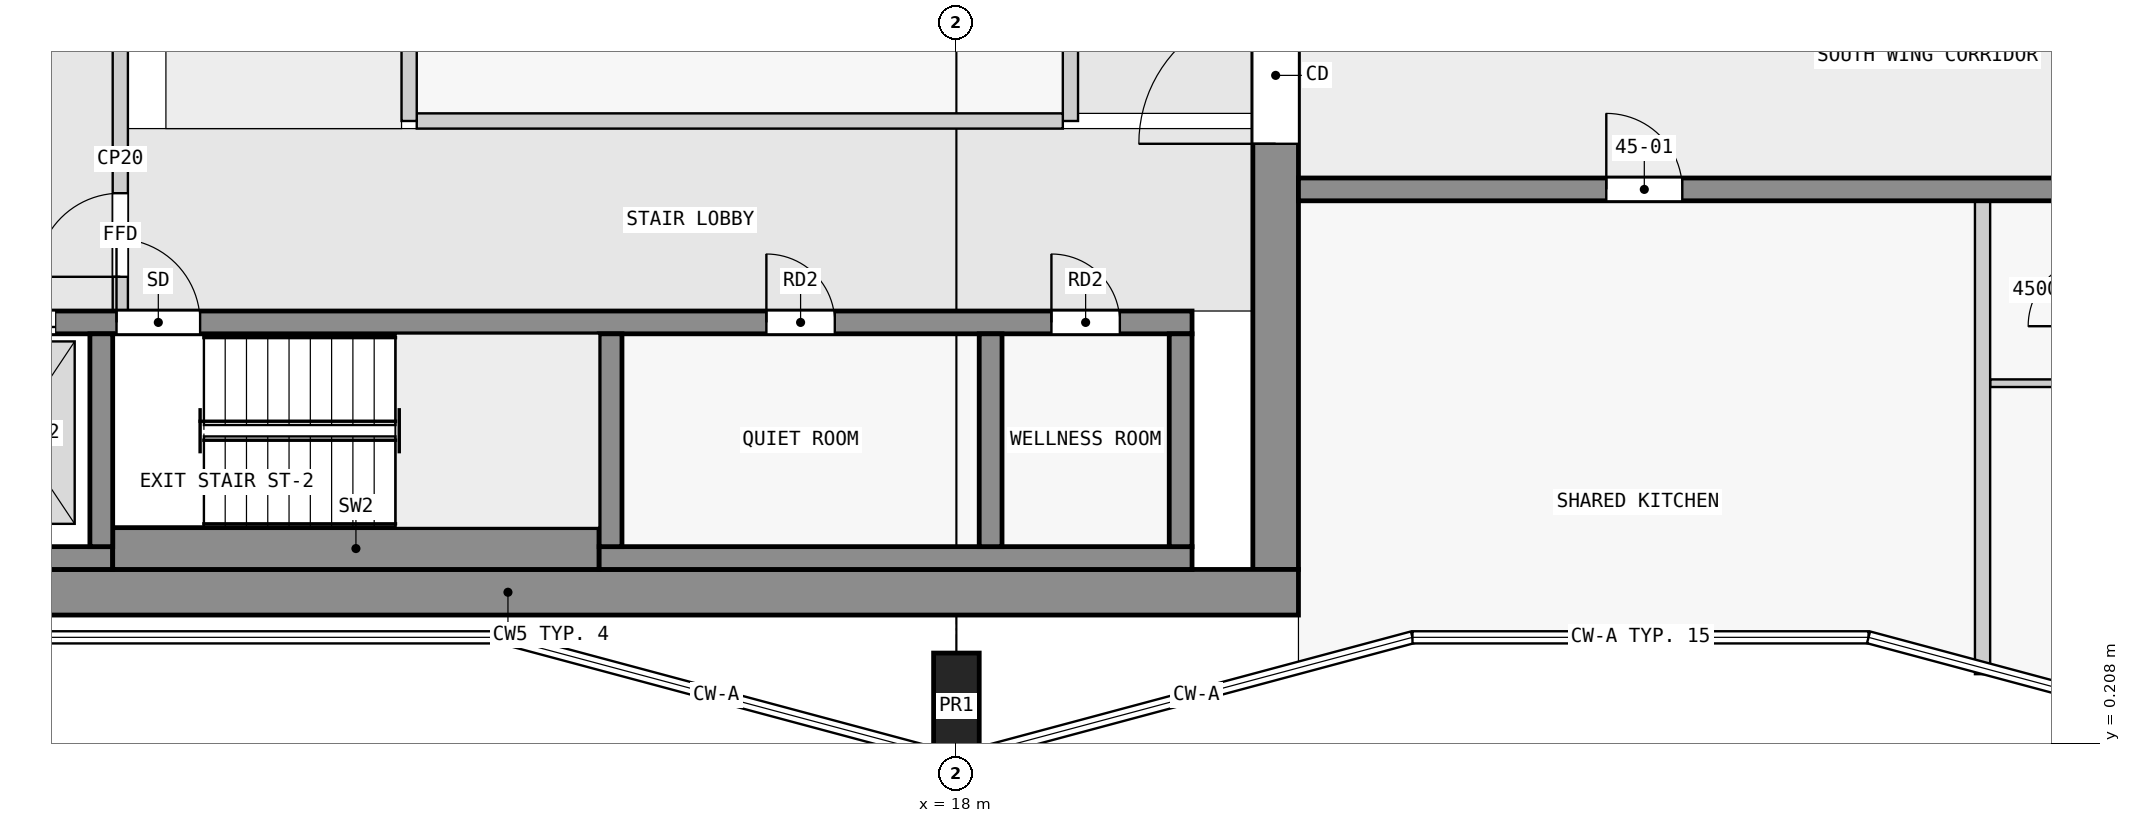
"""IFC4 building model, lengths in metres.
Left out: names, types, materials, properties, quantities, classifications, styles, units other than length and angle.
Written with IfcOpenShell. Run it as: python <this file> out.ifc"""

import sys

from ifc_helpers import new_model, si_unit, direction, frame, frame_2d, origin, origin_2d, place, context, subcontext, project, spatial, rectangle, extrude, element, fill, save


model = new_model("IFC4")
c1 = context("Model", 3, precision=1e-05, world=origin(), true_north=direction((0.0, 1.0)))
c2 = subcontext(c1, "Body", "Model", "MODEL_VIEW")
j1 = project(units=[si_unit("LENGTHUNIT", "METRE"), si_unit("PLANEANGLEUNIT", "RADIAN")], contexts=[c1])
p1 = place(None, origin())
s1 = spatial("IfcSite", under=j1, at=p1, CompositionType="ELEMENT")
p2 = place(p1, origin())
s2 = spatial("IfcBuilding", under=s1, at=p2, CompositionType="ELEMENT")
p3 = place(p2, frame((0.0, 0.0, 174.4)))
s3 = spatial("IfcBuildingStorey", under=s2, at=p3, CompositionType="ELEMENT", Elevation=174.4)
p4 = place(p3, frame((18.0, 0.7, 0.0), z_axis=(0.0, 0.0, 1.0), x_axis=(1.0, 0.0, 0.0)))
e1 = element("IfcColumn", 1, at=p4, inside=s3, PredefinedType="COLUMN", context=c2, shape_type="SweptSolid", body=[
    extrude(rectangle(XDim=0.6, YDim=1.4, at=origin_2d()), origin(), (0.0, 0.0, 1.0), 3.5),
])
p5 = place(p3, frame((1.7, 2.2, 0.0), z_axis=(0.0, 0.0, 1.0), x_axis=(1.0, 0.0, 0.0)))
e2 = element("IfcWall", 2, at=p5, inside=s3, PredefinedType="SHEAR", context=c2, shape_type="SweptSolid", body=[
    extrude(rectangle(XDim=20.8, YDim=0.6, at=frame_2d((10.4, 0.0))), origin(), (0.0, 0.0, 1.0), 3.25),
])
p6 = place(p3, frame((22.2, 2.5, 0.0), z_axis=(0.0, 0.0, 1.0), x_axis=(0.0, 1.0, 0.0)))
e3 = element("IfcWall", 3, at=p6, inside=s3, PredefinedType="SHEAR", context=c2, shape_type="SweptSolid", body=[
    extrude(rectangle(XDim=14.9, YDim=0.6, at=frame_2d((7.45, 0.0))), origin(), (0.0, 0.0, 1.0), 3.25),
])
p7 = place(p6, frame((5.6, 0.0, 0.0)))
e4 = element("IfcOpeningElement", 4, at=p7, cuts=e3, PredefinedType="OPENING", context=c2, shape_type="SweptSolid", body=[
    extrude(rectangle(XDim=1.8, YDim=2.1, at=frame_2d((0.9, 1.05))), frame((0.0, 0.31, 0.0), z_axis=(0.0, -1.0, 0.0), x_axis=(1.0, 0.0, 0.0)), (0.0, 0.0, 1.0), 0.62),
])
p8 = place(p3, frame((2.3, 2.65, 0.0), z_axis=(0.0, 0.0, 1.0), x_axis=(1.0, 0.0, 0.0)))
e5 = element("IfcWall", 5, at=p8, inside=s3, PredefinedType="SHEAR", context=c2, shape_type="SweptSolid", body=[
    extrude(rectangle(XDim=4.6, YDim=0.3, at=frame_2d((2.3, 0.0))), origin(), (0.0, 0.0, 1.0), 3.25),
])
p9 = place(p3, frame((6.9, 2.775, 0.0), z_axis=(0.0, 0.0, 1.0), x_axis=(1.0, 0.0, 0.0)))
e6 = element("IfcWall", 6, at=p9, inside=s3, PredefinedType="SHEAR", context=c2, shape_type="SweptSolid", body=[
    extrude(rectangle(XDim=6.4, YDim=0.55, at=frame_2d((3.2, 0.0))), origin(), (0.0, 0.0, 1.0), 3.25),
])
p10 = place(p3, frame((13.3, 2.65, 0.0), z_axis=(0.0, 0.0, 1.0), x_axis=(1.0, 0.0, 0.0)))
e7 = element("IfcWall", 7, at=p10, inside=s3, PredefinedType="SHEAR", context=c2, shape_type="SweptSolid", body=[
    extrude(rectangle(XDim=7.8, YDim=0.3, at=frame_2d((3.9, 0.0))), origin(), (0.0, 0.0, 1.0), 3.25),
])
for number, where, z_axis, x_axis in (
    (8, (6.75, 2.8, 0.0), (0.0, 0.0, 1.0), (0.0, 1.0, 0.0)),
    (9, (13.45, 2.8, 0.0), (0.0, 0.0, 1.0), (0.0, 1.0, 0.0)),
    (10, (18.45, 2.8, 0.0), (0.0, 0.0, 1.0), (0.0, 1.0, 0.0)),
    (11, (20.95, 2.8, 0.0), (0.0, 0.0, 1.0), (0.0, 1.0, 0.0)),
):
    element("IfcWall", number, at=place(p3, frame(where, z_axis=z_axis, x_axis=x_axis)), inside=s3, PredefinedType="SHEAR", context=c2, shape_type="SweptSolid", body=[
        extrude(rectangle(XDim=2.8, YDim=0.3, at=frame_2d((1.4, 0.0))), origin(), (0.0, 0.0, 1.0), 3.25),
    ])
p11 = place(p3, frame((2.3, 5.75, 0.0), z_axis=(0.0, 0.0, 1.0), x_axis=(1.0, 0.0, 0.0)))
e12 = element("IfcWall", 12, at=p11, inside=s3, PredefinedType="SHEAR", context=c2, shape_type="SweptSolid", body=[
    extrude(rectangle(XDim=18.8, YDim=0.3, at=frame_2d((9.4, 0.0))), origin(), (0.0, 0.0, 1.0), 3.25),
])
p12 = place(p11, frame((4.65, 0.0, 0.0)))
e13 = element("IfcOpeningElement", 13, at=p12, cuts=e12, PredefinedType="OPENING", context=c2, shape_type="SweptSolid", body=[
    extrude(rectangle(XDim=1.1, YDim=2.1, at=frame_2d((0.55, 1.05))), frame((0.0, 0.16, 0.0), z_axis=(0.0, -1.0, 0.0), x_axis=(1.0, 0.0, 0.0)), (0.0, 0.0, 1.0), 0.32),
])
p13 = place(p11, frame((0.45, 0.0, 0.0)))
e14 = element("IfcOpeningElement", 14, at=p13, cuts=e12, PredefinedType="OPENING", context=c2, shape_type="SweptSolid", body=[
    extrude(rectangle(XDim=1.1, YDim=2.1, at=frame_2d((0.55, 1.05))), frame((0.0, 0.16, 0.0), z_axis=(0.0, -1.0, 0.0), x_axis=(1.0, 0.0, 0.0)), (0.0, 0.0, 1.0), 0.32),
])
p14 = place(p11, frame((2.75, 0.0, 0.0)))
e15 = element("IfcOpeningElement", 15, at=p14, cuts=e12, PredefinedType="OPENING", context=c2, shape_type="SweptSolid", body=[
    extrude(rectangle(XDim=1.1, YDim=2.1, at=frame_2d((0.55, 1.05))), frame((0.0, 0.16, 0.0), z_axis=(0.0, -1.0, 0.0), x_axis=(1.0, 0.0, 0.0)), (0.0, 0.0, 1.0), 0.32),
])
p15 = place(p11, frame((13.2, 0.0, 0.0)))
e16 = element("IfcOpeningElement", 16, at=p15, cuts=e12, PredefinedType="OPENING", context=c2, shape_type="SweptSolid", body=[
    extrude(rectangle(XDim=0.9, YDim=2.1, at=frame_2d((0.45, 1.05))), frame((0.0, 0.16, 0.0), z_axis=(0.0, -1.0, 0.0), x_axis=(1.0, 0.0, 0.0)), (0.0, 0.0, 1.0), 0.32),
])
p16 = place(p11, frame((16.95, 0.0, 0.0)))
e17 = element("IfcOpeningElement", 17, at=p16, cuts=e12, PredefinedType="OPENING", context=c2, shape_type="SweptSolid", body=[
    extrude(rectangle(XDim=0.9, YDim=2.1, at=frame_2d((0.45, 1.05))), frame((0.0, 0.16, 0.0), z_axis=(0.0, -1.0, 0.0), x_axis=(1.0, 0.0, 0.0)), (0.0, 0.0, 1.0), 0.32),
])
p17 = place(p3, frame((22.5, 7.5, 0.0), z_axis=(0.0, 0.0, 1.0), x_axis=(1.0, 0.0, 0.0)))
e18 = element("IfcWall", 18, at=p17, inside=s3, PredefinedType="SHEAR", context=c2, shape_type="SweptSolid", body=[
    extrude(rectangle(XDim=22.5, YDim=0.3, at=frame_2d((11.25, 0.0))), origin(), (0.0, 0.0, 1.0), 3.25),
])
p18 = place(p17, frame((4.05, 0.0, 0.0)))
e19 = element("IfcOpeningElement", 19, at=p18, cuts=e18, PredefinedType="OPENING", context=c2, shape_type="SweptSolid", body=[
    extrude(rectangle(XDim=1.0, YDim=2.1, at=frame_2d((0.5, 1.05))), frame((0.0, 0.16, 0.0), z_axis=(0.0, -1.0, 0.0), x_axis=(1.0, 0.0, 0.0)), (0.0, 0.0, 1.0), 0.32),
])
p19 = place(p17, frame((10.75, 0.0, 0.0)))
e20 = element("IfcOpeningElement", 20, at=p19, cuts=e18, PredefinedType="OPENING", context=c2, shape_type="SweptSolid", body=[
    extrude(rectangle(XDim=1.0, YDim=2.1, at=frame_2d((0.5, 1.05))), frame((0.0, 0.16, 0.0), z_axis=(0.0, -1.0, 0.0), x_axis=(1.0, 0.0, 0.0)), (0.0, 0.0, 1.0), 0.32),
])
p20 = place(p17, frame((15.35, 0.0, 0.0)))
e21 = element("IfcOpeningElement", 21, at=p20, cuts=e18, PredefinedType="OPENING", context=c2, shape_type="SweptSolid", body=[
    extrude(rectangle(XDim=0.9, YDim=2.1, at=frame_2d((0.45, 1.05))), frame((0.0, 0.16, 0.0), z_axis=(0.0, -1.0, 0.0), x_axis=(1.0, 0.0, 0.0)), (0.0, 0.0, 1.0), 0.32),
])
p21 = place(p17, frame((18.75, 0.0, 0.0)))
e22 = element("IfcOpeningElement", 22, at=p21, cuts=e18, PredefinedType="OPENING", context=c2, shape_type="SweptSolid", body=[
    extrude(rectangle(XDim=0.9, YDim=2.1, at=frame_2d((0.45, 1.05))), frame((0.0, 0.16, 0.0), z_axis=(0.0, -1.0, 0.0), x_axis=(1.0, 0.0, 0.0)), (0.0, 0.0, 1.0), 0.32),
])
p22 = place(p17, frame((20.95, 0.0, 0.0)))
e23 = element("IfcOpeningElement", 23, at=p22, cuts=e18, PredefinedType="OPENING", context=c2, shape_type="SweptSolid", body=[
    extrude(rectangle(XDim=1.0, YDim=2.1, at=frame_2d((0.5, 1.05))), frame((0.0, 0.16, 0.0), z_axis=(0.0, -1.0, 0.0), x_axis=(1.0, 0.0, 0.0)), (0.0, 0.0, 1.0), 0.32),
])
p23 = place(p3, frame((7.0, 5.9, 0.0), z_axis=(0.0, 0.0, 1.0), x_axis=(0.0, 1.0, 0.0)))
e24 = element("IfcWall", 24, at=p23, inside=s3, PredefinedType="PARTITIONING", context=c2, shape_type="SweptSolid", body=[
    extrude(rectangle(XDim=4.0, YDim=0.2, at=frame_2d((2.0, 0.0))), origin(), (0.0, 0.0, 1.0), 3.25),
])
p24 = place(p23, frame((0.45, 0.0, 0.0)))
e25 = element("IfcOpeningElement", 25, at=p24, cuts=e24, PredefinedType="OPENING", context=c2, shape_type="SweptSolid", body=[
    extrude(rectangle(XDim=1.1, YDim=2.1, at=frame_2d((0.55, 1.05))), frame((0.0, 0.11, 0.0), z_axis=(0.0, -1.0, 0.0), x_axis=(1.0, 0.0, 0.0)), (0.0, 0.0, 1.0), 0.22),
])
p25 = place(p3, frame((10.8, 8.4, 0.0), z_axis=(0.0, 0.0, 1.0), x_axis=(0.0, 1.0, 0.0)))
e26 = element("IfcWall", 26, at=p25, inside=s3, PredefinedType="PARTITIONING", context=c2, shape_type="SweptSolid", body=[
    extrude(rectangle(XDim=3.8, YDim=0.2, at=frame_2d((1.9, 0.0))), origin(), (0.0, 0.0, 1.0), 3.25),
])
p26 = place(p3, frame((10.9, 8.4, 0.0), z_axis=(0.0, 0.0, 1.0), x_axis=(1.0, 0.0, 0.0)))
e27 = element("IfcWall", 27, at=p26, inside=s3, PredefinedType="PARTITIONING", context=c2, shape_type="SweptSolid", body=[
    extrude(rectangle(XDim=8.5, YDim=0.2, at=frame_2d((4.25, 0.0))), origin(), (0.0, 0.0, 1.0), 3.25),
])
p27 = place(p3, frame((19.5, 8.4, 0.0), z_axis=(0.0, 0.0, 1.0), x_axis=(0.0, 1.0, 0.0)))
e28 = element("IfcWall", 28, at=p27, inside=s3, PredefinedType="PARTITIONING", context=c2, shape_type="SweptSolid", body=[
    extrude(rectangle(XDim=3.8, YDim=0.2, at=frame_2d((1.9, 0.0))), origin(), (0.0, 0.0, 1.0), 3.25),
])
p28 = place(p3, frame((31.6, 4.95, 0.0), z_axis=(0.0, 0.0, 1.0), x_axis=(1.0, 0.0, 0.0)))
e29 = element("IfcWall", 29, at=p28, inside=s3, PredefinedType="PARTITIONING", context=c2, shape_type="SweptSolid", body=[
    extrude(rectangle(XDim=1.35, YDim=0.1, at=frame_2d((0.675, 0.0))), origin(), (0.0, 0.0, 1.0), 3.25),
])
p29 = place(p3, frame((31.5, 1.122, 0.0), z_axis=(0.0, 0.0, 1.0), x_axis=(0.0, 1.0, 0.0)))
e30 = element("IfcWall", 30, at=p29, inside=s3, PredefinedType="PARTITIONING", context=c2, shape_type="SweptSolid", body=[
    extrude(rectangle(XDim=6.228, YDim=0.2, at=frame_2d((3.114, 0.0))), origin(), (0.0, 0.0, 1.0), 3.25),
])
p30 = place(p24, origin())
e31 = element("IfcDoor", 31, at=p30, inside=s3, OperationType="SINGLE_SWING_LEFT", PredefinedType="DOOR", context=c2, shape_type="SweptSolid", body=[
    extrude(rectangle(XDim=1.1, YDim=2.1, at=frame_2d((0.55, 1.05))), frame((0.0, 0.025, 0.0), z_axis=(0.0, -1.0, 0.0), x_axis=(1.0, 0.0, 0.0)), (0.0, 0.0, 1.0), 0.05),
])
fill(e25, e31)
p31 = place(p12, origin())
e32 = element("IfcDoor", 32, at=p31, inside=s3, OperationType="SINGLE_SWING_LEFT", PredefinedType="DOOR", context=c2, shape_type="SweptSolid", body=[
    extrude(rectangle(XDim=1.1, YDim=2.1, at=frame_2d((0.55, 1.05))), frame((0.0, 0.025, 0.0), z_axis=(0.0, -1.0, 0.0), x_axis=(1.0, 0.0, 0.0)), (0.0, 0.0, 1.0), 0.05),
])
fill(e13, e32)
p32 = place(p14, origin())
e33 = element("IfcDoor", 33, at=p32, inside=s3, OperationType="DOUBLE_DOOR_SLIDING", PredefinedType="DOOR", context=c2, shape_type="SweptSolid", body=[
    extrude(rectangle(XDim=1.1, YDim=2.1, at=frame_2d((0.55, 1.05))), frame((0.0, 0.025, 0.0), z_axis=(0.0, -1.0, 0.0), x_axis=(1.0, 0.0, 0.0)), (0.0, 0.0, 1.0), 0.05),
])
fill(e15, e33)
p33 = place(p7, origin())
e34 = element("IfcDoor", 34, at=p33, inside=s3, OperationType="DOUBLE_DOOR_SINGLE_SWING", PredefinedType="DOOR", context=c2, shape_type="SweptSolid", body=[
    extrude(rectangle(XDim=1.8, YDim=2.1, at=frame_2d((0.9, 1.05))), frame((0.0, 0.025, 0.0), z_axis=(0.0, -1.0, 0.0), x_axis=(1.0, 0.0, 0.0)), (0.0, 0.0, 1.0), 0.05),
])
fill(e4, e34)
p34 = place(p15, origin())
e35 = element("IfcDoor", 35, at=p34, inside=s3, OperationType="SINGLE_SWING_LEFT", PredefinedType="DOOR", context=c2, shape_type="SweptSolid", body=[
    extrude(rectangle(XDim=0.9, YDim=2.1, at=frame_2d((0.45, 1.05))), frame((0.0, 0.025, 0.0), z_axis=(0.0, -1.0, 0.0), x_axis=(1.0, 0.0, 0.0)), (0.0, 0.0, 1.0), 0.05),
])
fill(e16, e35)
p35 = place(p16, origin())
e36 = element("IfcDoor", 36, at=p35, inside=s3, OperationType="SINGLE_SWING_LEFT", PredefinedType="DOOR", context=c2, shape_type="SweptSolid", body=[
    extrude(rectangle(XDim=0.9, YDim=2.1, at=frame_2d((0.45, 1.05))), frame((0.0, 0.025, 0.0), z_axis=(0.0, -1.0, 0.0), x_axis=(1.0, 0.0, 0.0)), (0.0, 0.0, 1.0), 0.05),
])
fill(e17, e36)
p36 = place(p18, origin())
e37 = element("IfcDoor", 37, at=p36, inside=s3, OperationType="SINGLE_SWING_LEFT", PredefinedType="DOOR", context=c2, shape_type="SweptSolid", body=[
    extrude(rectangle(XDim=1.0, YDim=2.1, at=frame_2d((0.5, 1.05))), frame((0.0, 0.025, 0.0), z_axis=(0.0, -1.0, 0.0), x_axis=(1.0, 0.0, 0.0)), (0.0, 0.0, 1.0), 0.05),
])
fill(e19, e37)
save(model, sys.argv[1])
